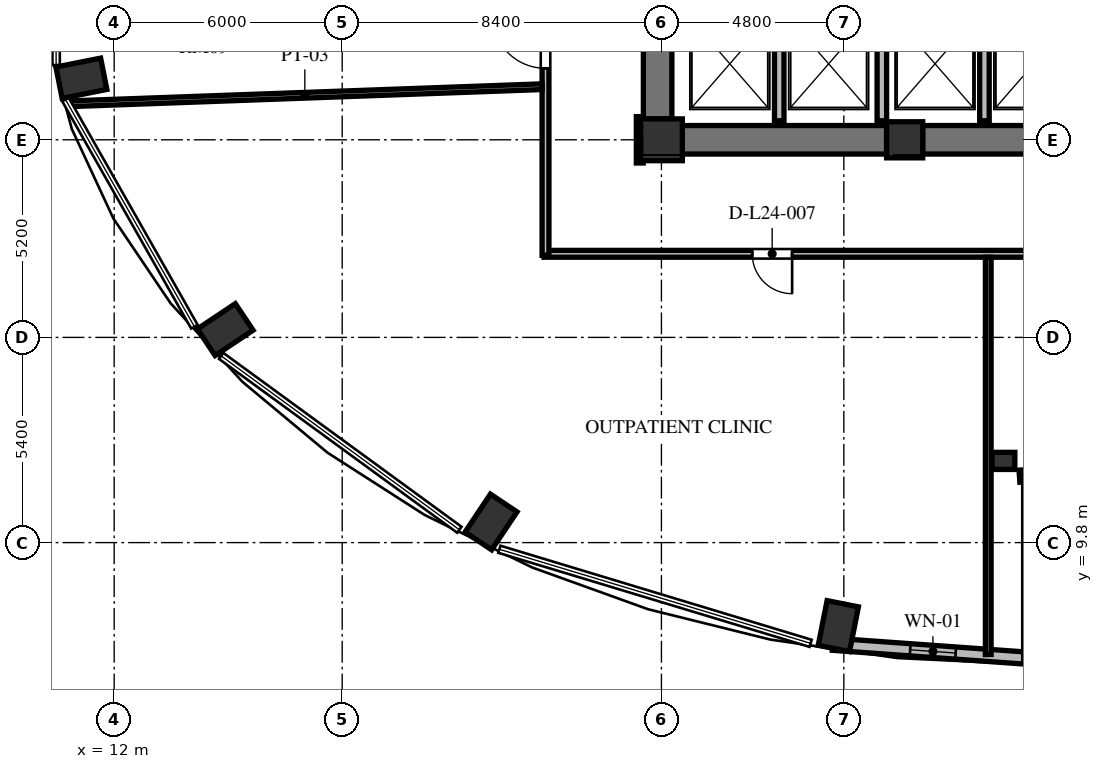
"""IFC4 building model, lengths in metres.
Left out: names, types, materials, properties, quantities, classifications, styles, units other than length and angle.
Written with IfcOpenShell. Run it as: python <this file> out.ifc"""

import sys

from ifc_helpers import new_model, si_unit, direction, frame, frame_2d, origin, origin_2d, place, context, subcontext, project, spatial, rectangle, extrude, element, fill, save


model = new_model("IFC4")
c1 = context("Model", 3, precision=1e-05, world=origin(), true_north=direction((0.0, 1.0)))
c2 = subcontext(c1, "Body", "Model", "MODEL_VIEW")
j1 = project(units=[si_unit("LENGTHUNIT", "METRE"), si_unit("PLANEANGLEUNIT", "RADIAN")], contexts=[c1])
p1 = place(None, origin())
s1 = spatial("IfcSite", under=j1, at=p1, CompositionType="ELEMENT")
p2 = place(p1, origin())
s2 = spatial("IfcBuilding", under=s1, at=p2, CompositionType="ELEMENT")
p3 = place(p2, frame((0.0, 0.0, 96.336)))
s3 = spatial("IfcBuildingStorey", under=s2, at=p3, CompositionType="ELEMENT", Elevation=96.336)
for number, where, z_axis, x_axis in (
    (1, (11.137, 22.02, 0.0), (0.0, 0.0, 1.0), (-0.981, -0.195, 0.0)),
    (2, (14.922, 15.405, 0.0), (0.0, 0.0, 1.0), (-0.831, -0.556, 0.0)),
    (3, (21.916, 10.343, 0.0), (0.0, 0.0, 1.0), (-0.556, -0.831, 0.0)),
    (4, (31.054, 7.603, 0.0), (0.0, 0.0, 1.0), (-0.195, -0.981, 0.0)),
):
    element("IfcColumn", number, at=place(p3, frame(where, z_axis=z_axis, x_axis=x_axis)), inside=s3, PredefinedType="COLUMN", context=c2, shape_type="SweptSolid", body=[
        extrude(rectangle(XDim=1.2, YDim=0.84, at=origin_2d()), origin(), (0.0, 0.0, 1.0), 3.648),
    ])
p4 = place(p3, frame((26.4, 20.4, 0.0), z_axis=(0.0, 0.0, 1.0), x_axis=(1.0, 0.0, 0.0)))
e5 = element("IfcColumn", 5, at=p4, inside=s3, PredefinedType="COLUMN", context=c2, shape_type="SweptSolid", body=[
    extrude(rectangle(XDim=1.1, YDim=1.1, at=origin_2d()), origin(), (0.0, 0.0, 1.0), 3.648),
])
p5 = place(p3, frame((32.8, 20.4, 0.0), z_axis=(0.0, 0.0, 1.0), x_axis=(1.0, 0.0, 0.0)))
e6 = element("IfcColumn", 6, at=p5, inside=s3, PredefinedType="COLUMN", context=c2, shape_type="SweptSolid", body=[
    extrude(rectangle(XDim=0.95, YDim=0.95, at=origin_2d()), origin(), (0.0, 0.0, 1.0), 3.648),
])
p6 = place(p3, frame((35.4, 11.95, 0.0), z_axis=(0.0, 0.0, 1.0), x_axis=(1.0, 0.0, 0.0)))
e7 = element("IfcColumn", 7, at=p6, inside=s3, PredefinedType="PILASTER", context=c2, shape_type="SweptSolid", body=[
    extrude(rectangle(XDim=0.6, YDim=0.45, at=origin_2d()), origin(), (0.0, 0.0, 1.0), 3.648),
])
p7 = place(p3, frame((26.3, 20.95, 0.0), z_axis=(0.0, 0.0, 1.0), x_axis=(0.0, 1.0, 0.0)))
e8 = element("IfcWall", 8, at=p7, inside=s3, PredefinedType="SHEAR", context=c2, shape_type="SweptSolid", body=[
    extrude(rectangle(XDim=14.1, YDim=0.75, at=frame_2d((7.05, 0.0))), origin(), (0.0, 0.0, 1.0), 3.648),
])
p8 = place(p7, frame((6.5, 0.0, 0.0)))
e9 = element("IfcOpeningElement", 9, at=p8, cuts=e8, PredefinedType="OPENING", context=c2, shape_type="SweptSolid", body=[
    extrude(rectangle(XDim=1.2, YDim=2.15, at=frame_2d((0.6, 1.075))), frame((0.0, 0.385, 0.0), z_axis=(0.0, -1.0, 0.0), x_axis=(1.0, 0.0, 0.0)), (0.0, 0.0, 1.0), 0.77),
])
p9 = place(p7, frame((9.6, 0.0, 0.0)))
e10 = element("IfcOpeningElement", 10, at=p9, cuts=e8, PredefinedType="OPENING", context=c2, shape_type="SweptSolid", body=[
    extrude(rectangle(XDim=1.3, YDim=2.2, at=frame_2d((0.65, 1.1))), frame((0.0, 0.385, 0.0), z_axis=(0.0, -1.0, 0.0), x_axis=(1.0, 0.0, 0.0)), (0.0, 0.0, 1.0), 0.77),
])
p10 = place(p7, frame((3.26, 0.0, 0.0)))
e11 = element("IfcOpeningElement", 11, at=p10, cuts=e8, PredefinedType="OPENING", context=c2, shape_type="SweptSolid", body=[
    extrude(rectangle(XDim=1.3, YDim=2.2, at=frame_2d((0.65, 1.1))), frame((0.0, 0.385, 0.0), z_axis=(0.0, -1.0, 0.0), x_axis=(1.0, 0.0, 0.0)), (0.0, 0.0, 1.0), 0.77),
])
p11 = place(p3, frame((26.95, 20.4, 0.0), z_axis=(0.0, 0.0, 1.0), x_axis=(1.0, 0.0, 0.0)))
e12 = element("IfcWall", 12, at=p11, inside=s3, PredefinedType="SHEAR", context=c2, shape_type="SweptSolid", body=[
    extrude(rectangle(XDim=5.375, YDim=0.75, at=frame_2d((2.688, 0.0))), origin(), (0.0, 0.0, 1.0), 3.648),
])
p12 = place(p3, frame((33.275, 20.4, 0.0), z_axis=(0.0, 0.0, 1.0), x_axis=(1.0, 0.0, 0.0)))
e13 = element("IfcWall", 13, at=p12, inside=s3, PredefinedType="SHEAR", context=c2, shape_type="SweptSolid", body=[
    extrude(rectangle(XDim=5.45, YDim=0.75, at=frame_2d((2.725, 0.0))), origin(), (0.0, 0.0, 1.0), 3.648),
])
p13 = place(p3, frame((35.821, 11.547, 0.0), z_axis=(0.0, 0.0, 1.0), x_axis=(0.997432364291, 0.071614793619, 0.0)))
e14 = element("IfcWall", 14, at=p13, inside=s3, PredefinedType="SOLIDWALL", context=c2, shape_type="SweptSolid", body=[
    extrude(rectangle(XDim=5.284, YDim=0.32, at=frame_2d((2.642, 0.0))), origin(), (0.0, 0.0, 1.0), 3.428),
])
p14 = place(p13, frame((2.042, 0.0, 0.85)))
e15 = element("IfcOpeningElement", 15, at=p14, cuts=e14, PredefinedType="OPENING", context=c2, shape_type="SweptSolid", body=[
    extrude(rectangle(XDim=1.2, YDim=1.8, at=frame_2d((0.6, 0.9))), frame((0.0, 0.17, 0.0), z_axis=(0.0, -1.0, 0.0), x_axis=(1.0, 0.0, 0.0)), (0.0, 0.0, 1.0), 0.34),
])
p15 = place(p3, frame((30.909, 7.125, 0.0), z_axis=(0.0, 0.0, 1.0), x_axis=(0.997431890304, -0.071621394884, 0.0)))
e16 = element("IfcWall", 16, at=p15, inside=s3, PredefinedType="SOLIDWALL", context=c2, shape_type="SweptSolid", body=[
    extrude(rectangle(XDim=5.284, YDim=0.32, at=frame_2d((2.642, 0.0))), origin(), (0.0, 0.0, 1.0), 3.428),
])
p16 = place(p15, frame((2.042, 0.0, 0.85)))
e17 = element("IfcOpeningElement", 17, at=p16, cuts=e16, PredefinedType="OPENING", context=c2, shape_type="SweptSolid", body=[
    extrude(rectangle(XDim=1.2, YDim=2.2, at=frame_2d((0.6, 1.1))), frame((0.0, 0.17, 0.0), z_axis=(0.0, -1.0, 0.0), x_axis=(1.0, 0.0, 0.0)), (0.0, 0.0, 1.0), 0.34),
])
for number, where, z_axis, x_axis in (
    (18, (29.5, 20.9, 0.0), (0.0, 0.0, 1.0), (0.0, 1.0, 0.0)),
    (19, (32.2, 20.9, 0.0), (0.0, 0.0, 1.0), (0.0, 1.0, 0.0)),
    (20, (34.9, 20.9, 0.0), (0.0, 0.0, 1.0), (0.0, 1.0, 0.0)),
):
    element("IfcWall", number, at=place(p3, frame(where, z_axis=z_axis, x_axis=x_axis)), inside=s3, PredefinedType="SOLIDWALL", context=c2, shape_type="SweptSolid", body=[
        extrude(rectangle(XDim=2.8, YDim=0.25, at=frame_2d((1.4, 0.0))), origin(), (0.0, 0.0, 1.0), 3.428),
    ])
p17 = place(p3, frame((25.83, 21.01, 0.0), z_axis=(0.0, 0.0, 1.0), x_axis=(0.0, -1.0, 0.0)))
e21 = element("IfcWall", 21, at=p17, inside=s3, PredefinedType="PARTITIONING", context=c2, shape_type="SweptSolid", body=[
    extrude(rectangle(XDim=1.22, YDim=0.18, at=frame_2d((0.61, 0.0))), origin(), (0.0, 0.0, 1.0), 3.428),
])
p18 = place(p3, frame((45.24, 17.4, 0.0), z_axis=(0.0, 0.0, 1.0), x_axis=(-1.0, 0.0, 0.0)))
e22 = element("IfcWall", 22, at=p18, inside=s3, PredefinedType="PARTITIONING", context=c2, shape_type="SweptSolid", body=[
    extrude(rectangle(XDim=21.93, YDim=0.18, at=frame_2d((10.965, 0.0))), origin(), (0.0, 0.0, 1.0), 3.053),
])
p19 = place(p18, frame((15.401, 0.0, 0.0)))
e23 = element("IfcOpeningElement", 23, at=p19, cuts=e22, PredefinedType="OPENING", context=c2, shape_type="SweptSolid", body=[
    extrude(rectangle(XDim=1.05, YDim=2.15, at=frame_2d((0.525, 1.075))), frame((0.0, 0.1, 0.0), z_axis=(0.0, -1.0, 0.0), x_axis=(1.0, 0.0, 0.0)), (0.0, 0.0, 1.0), 0.2),
])
p20 = place(p18, frame((4.754, 0.0, 0.0)))
e24 = element("IfcOpeningElement", 24, at=p20, cuts=e22, PredefinedType="OPENING", context=c2, shape_type="SweptSolid", body=[
    extrude(rectangle(XDim=1.05, YDim=2.15, at=frame_2d((0.525, 1.075))), frame((0.0, 0.1, 0.0), z_axis=(0.0, -1.0, 0.0), x_axis=(1.0, 0.0, 0.0)), (0.0, 0.0, 1.0), 0.2),
])
p21 = place(p3, frame((23.35, 17.36, 0.0), z_axis=(0.0, 0.0, 1.0), x_axis=(0.0, 1.0, 0.0)))
e25 = element("IfcWall", 25, at=p21, inside=s3, PredefinedType="PARTITIONING", context=c2, shape_type="SweptSolid", body=[
    extrude(rectangle(XDim=9.28, YDim=0.18, at=frame_2d((4.64, 0.0))), origin(), (0.0, 0.0, 1.0), 3.428),
])
p22 = place(p21, frame((4.921, 0.0, 0.0)))
e26 = element("IfcOpeningElement", 26, at=p22, cuts=e25, PredefinedType="OPENING", context=c2, shape_type="SweptSolid", body=[
    extrude(rectangle(XDim=1.4, YDim=2.2, at=frame_2d((0.7, 1.1))), frame((0.0, 0.1, 0.0), z_axis=(0.0, -1.0, 0.0), x_axis=(1.0, 0.0, 0.0)), (0.0, 0.0, 1.0), 0.2),
])
p23 = place(p3, frame((10.774, 21.346, 0.0), z_axis=(0.0, 0.0, 1.0), x_axis=(0.999347780952, 0.036111116092, 0.0)))
e27 = element("IfcWall", 27, at=p23, inside=s3, PredefinedType="PARTITIONING", context=c2, shape_type="SweptSolid", body=[
    extrude(rectangle(XDim=12.494, YDim=0.15, at=frame_2d((6.247, 0.0))), origin(), (0.0, 0.0, 1.0), 2.813),
])
p24 = place(p3, frame((35.0, 6.856, 0.0), z_axis=(0.0, 0.0, 1.0), x_axis=(0.0, 1.0, 0.0)))
e28 = element("IfcWall", 28, at=p24, inside=s3, PredefinedType="PARTITIONING", context=c2, shape_type="SweptSolid", body=[
    extrude(rectangle(XDim=10.454, YDim=0.15, at=frame_2d((5.227, 0.0))), origin(), (0.0, 0.0, 1.0), 3.428),
])
p25 = place(p16, origin())
e29 = element("IfcWindow", 29, at=p25, inside=s3, PartitioningType="SINGLE_PANEL", PredefinedType="WINDOW", context=c2, shape_type="SweptSolid", body=[
    extrude(rectangle(XDim=1.2, YDim=2.2, at=frame_2d((0.6, 1.1))), frame((0.0, 0.03, 0.0), z_axis=(0.0, -1.0, 0.0), x_axis=(1.0, 0.0, 0.0)), (0.0, 0.0, 1.0), 0.06),
])
fill(e17, e29)
p26 = place(p22, origin())
e30 = element("IfcDoor", 30, at=p26, inside=s3, OperationType="SINGLE_SWING_RIGHT", PredefinedType="DOOR", context=c2, shape_type="SweptSolid", body=[
    extrude(rectangle(XDim=1.4, YDim=2.2, at=frame_2d((0.7, 1.1))), frame((0.0, 0.025, 0.0), z_axis=(0.0, -1.0, 0.0), x_axis=(1.0, 0.0, 0.0)), (0.0, 0.0, 1.0), 0.05),
])
fill(e26, e30)
p27 = place(p19, origin())
e31 = element("IfcDoor", 31, at=p27, inside=s3, OperationType="SINGLE_SWING_LEFT", PredefinedType="DOOR", context=c2, shape_type="SweptSolid", body=[
    extrude(rectangle(XDim=1.05, YDim=2.15, at=frame_2d((0.525, 1.075))), frame((0.0, 0.025, 0.0), z_axis=(0.0, -1.0, 0.0), x_axis=(1.0, 0.0, 0.0)), (0.0, 0.0, 1.0), 0.05),
])
fill(e23, e31)
save(model, sys.argv[1])
